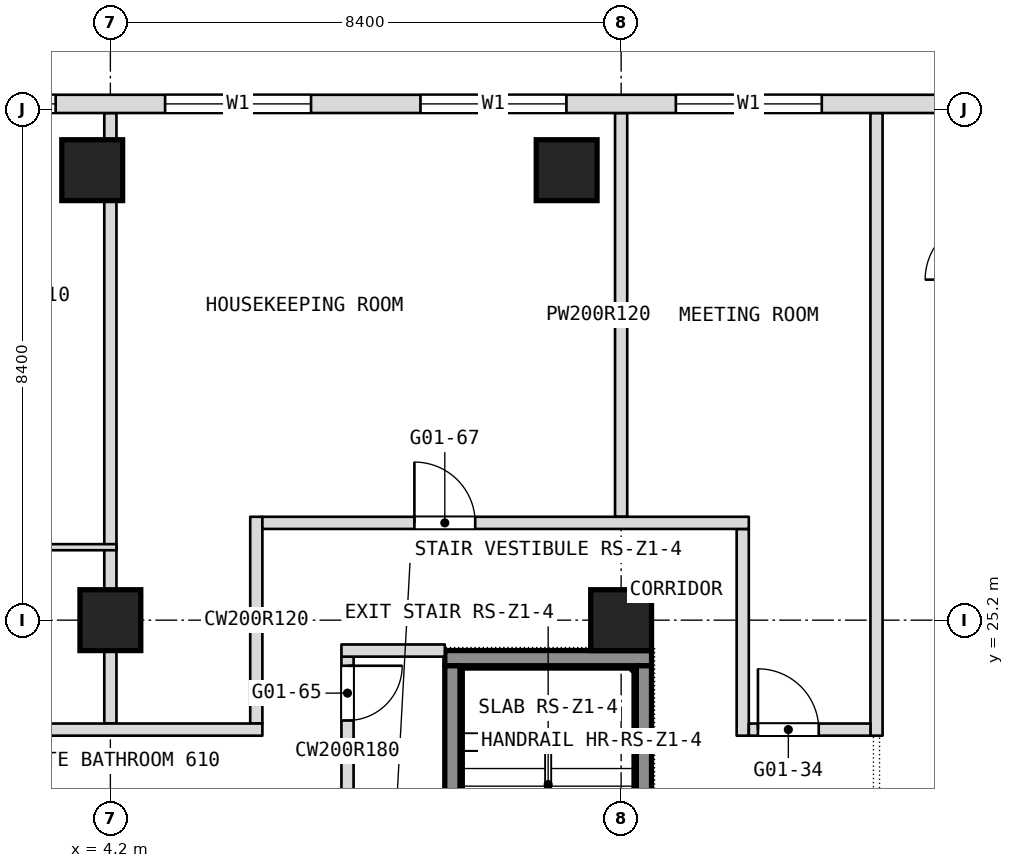
"""IFC4 building model, lengths in metres.
Left out: names, types, materials, properties, quantities, classifications, styles, units other than length and angle.
Written with IfcOpenShell. Run it as: python <this file> out.ifc"""

import sys

from ifc_helpers import new_model, si_unit, direction, frame, frame_2d, origin, origin_2d, place, context, subcontext, project, spatial, rectangle, extrude, element, fill, save


model = new_model("IFC4")
c1 = context("Model", 3, precision=1e-05, world=origin(), true_north=direction((0.0, 1.0)))
c2 = subcontext(c1, "Body", "Model", "MODEL_VIEW")
j1 = project(units=[si_unit("LENGTHUNIT", "METRE"), si_unit("PLANEANGLEUNIT", "RADIAN")], contexts=[c1])
p1 = place(None, origin())
s1 = spatial("IfcSite", under=j1, at=p1, CompositionType="ELEMENT")
p2 = place(p1, origin())
s2 = spatial("IfcBuilding", under=s1, at=p2, CompositionType="ELEMENT")
p3 = place(p2, frame((0.0, 0.0, 36.5)))
s3 = spatial("IfcBuildingStorey", under=s2, at=p3, CompositionType="ELEMENT", Elevation=36.5)
for number, where, z_axis, x_axis in (
    (1, (4.2, 25.2, 0.0), (0.0, 0.0, 1.0), (1.0, 0.0, 0.0)),
    (2, (12.6, 25.2, 0.0), (0.0, 0.0, 1.0), (1.0, 0.0, 0.0)),
    (3, (3.901, 32.6, 0.0), (0.0, 0.0, 1.0), (1.0, 0.0, 0.0)),
    (4, (11.704, 32.6, 0.0), (0.0, 0.0, 1.0), (1.0, 0.0, 0.0)),
):
    element("IfcColumn", number, at=place(p3, frame(where, z_axis=z_axis, x_axis=x_axis)), inside=s3, PredefinedType="COLUMN", context=c2, shape_type="SweptSolid", body=[
        extrude(rectangle(XDim=1.0, YDim=1.0, at=origin_2d()), origin(), (0.0, 0.0, 1.0), 3.6),
    ])
p4 = place(p3, frame((16.8, 23.3, 0.0), z_axis=(0.0, 0.0, 1.0), x_axis=(0.0, 1.0, 0.0)))
e5 = element("IfcWall", 5, at=p4, inside=s3, PredefinedType="PARTITIONING", context=c2, shape_type="SweptSolid", body=[
    extrude(rectangle(XDim=10.24, YDim=0.2, at=frame_2d((5.12, 0.0))), origin(), (0.0, 0.0, 1.0), 3.34),
])
p5 = place(p3, frame((14.6, 23.3, 0.0), z_axis=(0.0, 0.0, 1.0), x_axis=(0.0, 1.0, 0.0)))
e6 = element("IfcWall", 6, at=p5, inside=s3, PredefinedType="PARTITIONING", context=c2, shape_type="SweptSolid", body=[
    extrude(rectangle(XDim=3.4, YDim=0.2, at=frame_2d((1.7, 0.0))), origin(), (0.0, 0.0, 1.0), 3.34),
])
p6 = place(p3, frame((12.6, 26.9, 0.0), z_axis=(0.0, 0.0, 1.0), x_axis=(0.0, 1.0, 0.0)))
e7 = element("IfcWall", 7, at=p6, inside=s3, PredefinedType="PARTITIONING", context=c2, shape_type="SweptSolid", body=[
    extrude(rectangle(XDim=6.64, YDim=0.2, at=frame_2d((3.32, 0.0))), origin(), (0.0, 0.0, 1.0), 3.34),
])
p7 = place(p3, frame((8.1, 21.5, 0.0), z_axis=(0.0, 0.0, 1.0), x_axis=(0.0, 1.0, 0.0)))
e8 = element("IfcWall", 8, at=p7, inside=s3, PredefinedType="PARTITIONING", context=c2, shape_type="SweptSolid", body=[
    extrude(rectangle(XDim=3.1, YDim=0.2, at=frame_2d((1.55, 0.0))), origin(), (0.0, 0.0, 1.0), 3.34),
])
p8 = place(p7, frame((2.05, 0.0, 0.0)))
e9 = element("IfcOpeningElement", 9, at=p8, cuts=e8, PredefinedType="OPENING", context=c2, shape_type="SweptSolid", body=[
    extrude(rectangle(XDim=0.9, YDim=2.1, at=frame_2d((0.45, 1.05))), frame((0.0, 0.1, 0.0), z_axis=(0.0, -1.0, 0.0), x_axis=(1.0, 0.0, 0.0)), (0.0, 0.0, 1.0), 0.2),
])
p9 = place(p3, frame((6.6, 23.5, 0.0), z_axis=(0.0, 0.0, 1.0), x_axis=(0.0, 1.0, 0.0)))
e10 = element("IfcWall", 10, at=p9, inside=s3, PredefinedType="PARTITIONING", context=c2, shape_type="SweptSolid", body=[
    extrude(rectangle(XDim=3.4, YDim=0.2, at=frame_2d((1.7, 0.0))), origin(), (0.0, 0.0, 1.0), 3.34),
])
p10 = place(p3, frame((4.2, 23.5, 0.0), z_axis=(0.0, 0.0, 1.0), x_axis=(0.0, 1.0, 0.0)))
e11 = element("IfcWall", 11, at=p10, inside=s3, PredefinedType="PARTITIONING", context=c2, shape_type="SweptSolid", body=[
    extrude(rectangle(XDim=10.04, YDim=0.2, at=frame_2d((5.02, 0.0))), origin(), (0.0, 0.0, 1.0), 3.34),
])
p11 = place(p3, frame((-16.7, 23.4, 0.0), z_axis=(0.0, 0.0, 1.0), x_axis=(1.0, 0.0, 0.0)))
e12 = element("IfcWall", 12, at=p11, inside=s3, PredefinedType="PARTITIONING", context=c2, shape_type="SweptSolid", body=[
    extrude(rectangle(XDim=23.4, YDim=0.2, at=frame_2d((11.7, 0.0))), origin(), (0.0, 0.0, 1.0), 3.34),
])
p12 = place(p11, frame((2.4, 0.0, 0.0)))
e13 = element("IfcOpeningElement", 13, at=p12, cuts=e12, PredefinedType="OPENING", context=c2, shape_type="SweptSolid", body=[
    extrude(rectangle(XDim=0.9, YDim=2.1, at=frame_2d((0.45, 1.05))), frame((0.0, 0.1, 0.0), z_axis=(0.0, -1.0, 0.0), x_axis=(1.0, 0.0, 0.0)), (0.0, 0.0, 1.0), 0.2),
])
p13 = place(p11, frame((5.65, 0.0, 0.0)))
e14 = element("IfcOpeningElement", 14, at=p13, cuts=e12, PredefinedType="OPENING", context=c2, shape_type="SweptSolid", body=[
    extrude(rectangle(XDim=1.1, YDim=2.1, at=frame_2d((0.55, 1.05))), frame((0.0, 0.1, 0.0), z_axis=(0.0, -1.0, 0.0), x_axis=(1.0, 0.0, 0.0)), (0.0, 0.0, 1.0), 0.2),
])
p14 = place(p11, frame((15.3, 0.0, 0.0)))
e15 = element("IfcOpeningElement", 15, at=p14, cuts=e12, PredefinedType="OPENING", context=c2, shape_type="SweptSolid", body=[
    extrude(rectangle(XDim=1.0, YDim=2.1, at=frame_2d((0.5, 1.05))), frame((0.0, 0.1, 0.0), z_axis=(0.0, -1.0, 0.0), x_axis=(1.0, 0.0, 0.0)), (0.0, 0.0, 1.0), 0.2),
])
p15 = place(p11, frame((17.1, 0.0, 0.0)))
e16 = element("IfcOpeningElement", 16, at=p15, cuts=e12, PredefinedType="OPENING", context=c2, shape_type="SweptSolid", body=[
    extrude(rectangle(XDim=1.0, YDim=2.1, at=frame_2d((0.5, 1.05))), frame((0.0, 0.1, 0.0), z_axis=(0.0, -1.0, 0.0), x_axis=(1.0, 0.0, 0.0)), (0.0, 0.0, 1.0), 0.2),
])
p16 = place(p3, frame((14.7, 23.4, 0.0), z_axis=(0.0, 0.0, 1.0), x_axis=(1.0, 0.0, 0.0)))
e17 = element("IfcWall", 17, at=p16, inside=s3, PredefinedType="PARTITIONING", context=c2, shape_type="SweptSolid", body=[
    extrude(rectangle(XDim=2.0, YDim=0.2, at=frame_2d((1.0, 0.0))), origin(), (0.0, 0.0, 1.0), 3.34),
])
p17 = place(p16, frame((0.15, 0.0, 0.0)))
e18 = element("IfcOpeningElement", 18, at=p17, cuts=e17, PredefinedType="OPENING", context=c2, shape_type="SweptSolid", body=[
    extrude(rectangle(XDim=1.0, YDim=2.1, at=frame_2d((0.5, 1.05))), frame((0.0, 0.1, 0.0), z_axis=(0.0, -1.0, 0.0), x_axis=(1.0, 0.0, 0.0)), (0.0, 0.0, 1.0), 0.2),
])
p18 = place(p3, frame((8.0, 24.7, 0.0), z_axis=(0.0, 0.0, 1.0), x_axis=(1.0, 0.0, 0.0)))
e19 = element("IfcWall", 19, at=p18, inside=s3, PredefinedType="PARTITIONING", context=c2, shape_type="SweptSolid", body=[
    extrude(rectangle(XDim=1.7, YDim=0.2, at=frame_2d((0.85, 0.0))), origin(), (0.0, 0.0, 1.0), 3.34),
])
p19 = place(p3, frame((1.75, 26.4, 0.0), z_axis=(0.0, 0.0, 1.0), x_axis=(1.0, 0.0, 0.0)))
e20 = element("IfcWall", 20, at=p19, inside=s3, PredefinedType="PARTITIONING", context=c2, shape_type="SweptSolid", body=[
    extrude(rectangle(XDim=2.55, YDim=0.1, at=frame_2d((1.275, 0.0))), origin(), (0.0, 0.0, 1.0), 3.34),
])
p20 = place(p19, frame((0.15, 0.0, 0.0)))
e21 = element("IfcOpeningElement", 21, at=p20, cuts=e20, PredefinedType="OPENING", context=c2, shape_type="SweptSolid", body=[
    extrude(rectangle(XDim=0.9, YDim=2.1, at=frame_2d((0.45, 1.05))), frame((0.0, 0.05, 0.0), z_axis=(0.0, -1.0, 0.0), x_axis=(1.0, 0.0, 0.0)), (0.0, 0.0, 1.0), 0.1),
])
p21 = place(p3, frame((6.7, 26.8, 0.0), z_axis=(0.0, 0.0, 1.0), x_axis=(1.0, 0.0, 0.0)))
e22 = element("IfcWall", 22, at=p21, inside=s3, PredefinedType="PARTITIONING", context=c2, shape_type="SweptSolid", body=[
    extrude(rectangle(XDim=8.0, YDim=0.2, at=frame_2d((4.0, 0.0))), origin(), (0.0, 0.0, 1.0), 3.34),
])
p22 = place(p21, frame((2.5, 0.0, 0.0)))
e23 = element("IfcOpeningElement", 23, at=p22, cuts=e22, PredefinedType="OPENING", context=c2, shape_type="SweptSolid", body=[
    extrude(rectangle(XDim=1.0, YDim=2.1, at=frame_2d((0.5, 1.05))), frame((0.0, 0.1, 0.0), z_axis=(0.0, -1.0, 0.0), x_axis=(1.0, 0.0, 0.0)), (0.0, 0.0, 1.0), 0.2),
])
p23 = place(p3, frame((23.406, 33.69, 0.0), z_axis=(0.0, 0.0, 1.0), x_axis=(-1.0, 0.0, 0.0)))
e24 = element("IfcWall", 24, at=p23, inside=s3, PredefinedType="NOTDEFINED", context=c2, shape_type="SweptSolid", body=[
    extrude(rectangle(XDim=46.812, YDim=0.3, at=frame_2d((23.406, 0.0))), origin(), (0.0, 0.0, 1.0), 3.6),
])
p24 = place(p23, frame((2.186, 0.0, 0.9)))
e25 = element("IfcOpeningElement", 25, at=p24, cuts=e24, PredefinedType="OPENING", context=c2, shape_type="SweptSolid", body=[
    extrude(rectangle(XDim=2.4, YDim=2.1, at=frame_2d((1.2, 1.05))), frame((0.0, 0.15, 0.0), z_axis=(0.0, -1.0, 0.0), x_axis=(1.0, 0.0, 0.0)), (0.0, 0.0, 1.0), 0.3),
])
p25 = place(p23, frame((7.506, 0.0, 0.9)))
e26 = element("IfcOpeningElement", 26, at=p25, cuts=e24, PredefinedType="OPENING", context=c2, shape_type="SweptSolid", body=[
    extrude(rectangle(XDim=2.4, YDim=2.1, at=frame_2d((1.2, 1.05))), frame((0.0, 0.15, 0.0), z_axis=(0.0, -1.0, 0.0), x_axis=(1.0, 0.0, 0.0)), (0.0, 0.0, 1.0), 0.3),
])
p26 = place(p23, frame((11.706, 0.0, 0.9)))
e27 = element("IfcOpeningElement", 27, at=p26, cuts=e24, PredefinedType="OPENING", context=c2, shape_type="SweptSolid", body=[
    extrude(rectangle(XDim=2.4, YDim=2.1, at=frame_2d((1.2, 1.05))), frame((0.0, 0.15, 0.0), z_axis=(0.0, -1.0, 0.0), x_axis=(1.0, 0.0, 0.0)), (0.0, 0.0, 1.0), 0.3),
])
p27 = place(p23, frame((15.906, 0.0, 0.9)))
e28 = element("IfcOpeningElement", 28, at=p27, cuts=e24, PredefinedType="OPENING", context=c2, shape_type="SweptSolid", body=[
    extrude(rectangle(XDim=2.4, YDim=2.1, at=frame_2d((1.2, 1.05))), frame((0.0, 0.15, 0.0), z_axis=(0.0, -1.0, 0.0), x_axis=(1.0, 0.0, 0.0)), (0.0, 0.0, 1.0), 0.3),
])
p28 = place(p23, frame((20.106, 0.0, 0.9)))
e29 = element("IfcOpeningElement", 29, at=p28, cuts=e24, PredefinedType="OPENING", context=c2, shape_type="SweptSolid", body=[
    extrude(rectangle(XDim=2.4, YDim=2.1, at=frame_2d((1.2, 1.05))), frame((0.0, 0.15, 0.0), z_axis=(0.0, -1.0, 0.0), x_axis=(1.0, 0.0, 0.0)), (0.0, 0.0, 1.0), 0.3),
])
p29 = place(p23, frame((24.306, 0.0, 0.9)))
e30 = element("IfcOpeningElement", 30, at=p29, cuts=e24, PredefinedType="OPENING", context=c2, shape_type="SweptSolid", body=[
    extrude(rectangle(XDim=2.4, YDim=2.1, at=frame_2d((1.2, 1.05))), frame((0.0, 0.15, 0.0), z_axis=(0.0, -1.0, 0.0), x_axis=(1.0, 0.0, 0.0)), (0.0, 0.0, 1.0), 0.3),
])
p30 = place(p23, frame((28.506, 0.0, 0.9)))
e31 = element("IfcOpeningElement", 31, at=p30, cuts=e24, PredefinedType="OPENING", context=c2, shape_type="SweptSolid", body=[
    extrude(rectangle(XDim=2.4, YDim=2.1, at=frame_2d((1.2, 1.05))), frame((0.0, 0.15, 0.0), z_axis=(0.0, -1.0, 0.0), x_axis=(1.0, 0.0, 0.0)), (0.0, 0.0, 1.0), 0.3),
])
p31 = place(p23, frame((32.706, 0.0, 0.9)))
e32 = element("IfcOpeningElement", 32, at=p31, cuts=e24, PredefinedType="OPENING", context=c2, shape_type="SweptSolid", body=[
    extrude(rectangle(XDim=2.4, YDim=2.1, at=frame_2d((1.2, 1.05))), frame((0.0, 0.15, 0.0), z_axis=(0.0, -1.0, 0.0), x_axis=(1.0, 0.0, 0.0)), (0.0, 0.0, 1.0), 0.3),
])
p32 = place(p23, frame((36.906, 0.0, 0.9)))
e33 = element("IfcOpeningElement", 33, at=p32, cuts=e24, PredefinedType="OPENING", context=c2, shape_type="SweptSolid", body=[
    extrude(rectangle(XDim=2.4, YDim=2.1, at=frame_2d((1.2, 1.05))), frame((0.0, 0.15, 0.0), z_axis=(0.0, -1.0, 0.0), x_axis=(1.0, 0.0, 0.0)), (0.0, 0.0, 1.0), 0.3),
])
p33 = place(p23, frame((42.226, 0.0, 0.9)))
e34 = element("IfcOpeningElement", 34, at=p33, cuts=e24, PredefinedType="OPENING", context=c2, shape_type="SweptSolid", body=[
    extrude(rectangle(XDim=2.4, YDim=2.1, at=frame_2d((1.2, 1.05))), frame((0.0, 0.15, 0.0), z_axis=(0.0, -1.0, 0.0), x_axis=(1.0, 0.0, 0.0)), (0.0, 0.0, 1.0), 0.3),
])
p34 = place(p3, frame((9.7, 24.575, -0.15), z_axis=(0.0, 0.0, 1.0), x_axis=(1.0, 0.0, 0.0)))
e35 = element("IfcWall", 35, at=p34, inside=s3, PredefinedType="SHEAR", context=c2, shape_type="SweptSolid", body=[
    extrude(rectangle(XDim=3.4, YDim=0.25, at=frame_2d((1.7, 0.0))), origin(), (0.0, 0.0, 1.0), 3.85),
])
p35 = place(p3, frame((9.825, 18.75, -0.15), z_axis=(0.0, 0.0, 1.0), x_axis=(0.0, 1.0, 0.0)))
e36 = element("IfcWall", 36, at=p35, inside=s3, PredefinedType="SHEAR", context=c2, shape_type="SweptSolid", body=[
    extrude(rectangle(XDim=5.7, YDim=0.25, at=frame_2d((2.85, 0.0))), origin(), (0.0, 0.0, 1.0), 3.85),
])
p36 = place(p35, frame((0.2, 0.0, 0.0)))
e37 = element("IfcOpeningElement", 37, at=p36, cuts=e36, PredefinedType="OPENING", context=c2, shape_type="SweptSolid", body=[
    extrude(rectangle(XDim=1.0, YDim=2.1, at=frame_2d((0.5, 1.05))), frame((0.0, 0.125, 0.0), z_axis=(0.0, -1.0, 0.0), x_axis=(1.0, 0.0, 0.0)), (0.0, 0.0, 1.0), 0.25),
])
p37 = place(p3, frame((12.975, 18.75, -0.15), z_axis=(0.0, 0.0, 1.0), x_axis=(0.0, 1.0, 0.0)))
e38 = element("IfcWall", 38, at=p37, inside=s3, PredefinedType="SHEAR", context=c2, shape_type="SweptSolid", body=[
    extrude(rectangle(XDim=5.7, YDim=0.25, at=frame_2d((2.85, 0.0))), origin(), (0.0, 0.0, 1.0), 3.85),
])
p38 = place(p8, origin())
e39 = element("IfcDoor", 39, at=p38, inside=s3, OperationType="SINGLE_SWING_LEFT", PredefinedType="DOOR", context=c2, shape_type="SweptSolid", body=[
    extrude(rectangle(XDim=0.9, YDim=2.1, at=frame_2d((0.45, 1.05))), frame((0.0, 0.025, 0.0), z_axis=(0.0, -1.0, 0.0), x_axis=(1.0, 0.0, 0.0)), (0.0, 0.0, 1.0), 0.05),
])
fill(e9, e39)
p39 = place(p17, origin())
e40 = element("IfcDoor", 40, at=p39, inside=s3, OperationType="SINGLE_SWING_LEFT", PredefinedType="DOOR", context=c2, shape_type="SweptSolid", body=[
    extrude(rectangle(XDim=1.0, YDim=2.1, at=frame_2d((0.5, 1.05))), frame((0.0, 0.025, 0.0), z_axis=(0.0, -1.0, 0.0), x_axis=(1.0, 0.0, 0.0)), (0.0, 0.0, 1.0), 0.05),
])
fill(e18, e40)
p40 = place(p22, origin())
e41 = element("IfcDoor", 41, at=p40, inside=s3, OperationType="SINGLE_SWING_LEFT", PredefinedType="DOOR", context=c2, shape_type="SweptSolid", body=[
    extrude(rectangle(XDim=1.0, YDim=2.1, at=frame_2d((0.5, 1.05))), frame((0.0, 0.025, 0.0), z_axis=(0.0, -1.0, 0.0), x_axis=(1.0, 0.0, 0.0)), (0.0, 0.0, 1.0), 0.05),
])
fill(e23, e41)
p41 = place(p25, origin())
e42 = element("IfcWindow", 42, at=p41, inside=s3, PartitioningType="SINGLE_PANEL", PredefinedType="WINDOW", context=c2, shape_type="SweptSolid", body=[
    extrude(rectangle(XDim=2.4, YDim=2.1, at=frame_2d((1.2, 1.05))), frame((0.0, 0.03, 0.0), z_axis=(0.0, -1.0, 0.0), x_axis=(1.0, 0.0, 0.0)), (0.0, 0.0, 1.0), 0.06),
])
fill(e26, e42)
p42 = place(p26, origin())
e43 = element("IfcWindow", 43, at=p42, inside=s3, PartitioningType="SINGLE_PANEL", PredefinedType="WINDOW", context=c2, shape_type="SweptSolid", body=[
    extrude(rectangle(XDim=2.4, YDim=2.1, at=frame_2d((1.2, 1.05))), frame((0.0, 0.03, 0.0), z_axis=(0.0, -1.0, 0.0), x_axis=(1.0, 0.0, 0.0)), (0.0, 0.0, 1.0), 0.06),
])
fill(e27, e43)
p43 = place(p27, origin())
e44 = element("IfcWindow", 44, at=p43, inside=s3, PartitioningType="SINGLE_PANEL", PredefinedType="WINDOW", context=c2, shape_type="SweptSolid", body=[
    extrude(rectangle(XDim=2.4, YDim=2.1, at=frame_2d((1.2, 1.05))), frame((0.0, 0.03, 0.0), z_axis=(0.0, -1.0, 0.0), x_axis=(1.0, 0.0, 0.0)), (0.0, 0.0, 1.0), 0.06),
])
fill(e28, e44)
p44 = place(p28, origin())
e45 = element("IfcWindow", 45, at=p44, inside=s3, PartitioningType="SINGLE_PANEL", PredefinedType="WINDOW", context=c2, shape_type="SweptSolid", body=[
    extrude(rectangle(XDim=2.4, YDim=2.1, at=frame_2d((1.2, 1.05))), frame((0.0, 0.03, 0.0), z_axis=(0.0, -1.0, 0.0), x_axis=(1.0, 0.0, 0.0)), (0.0, 0.0, 1.0), 0.06),
])
fill(e29, e45)
save(model, sys.argv[1])
